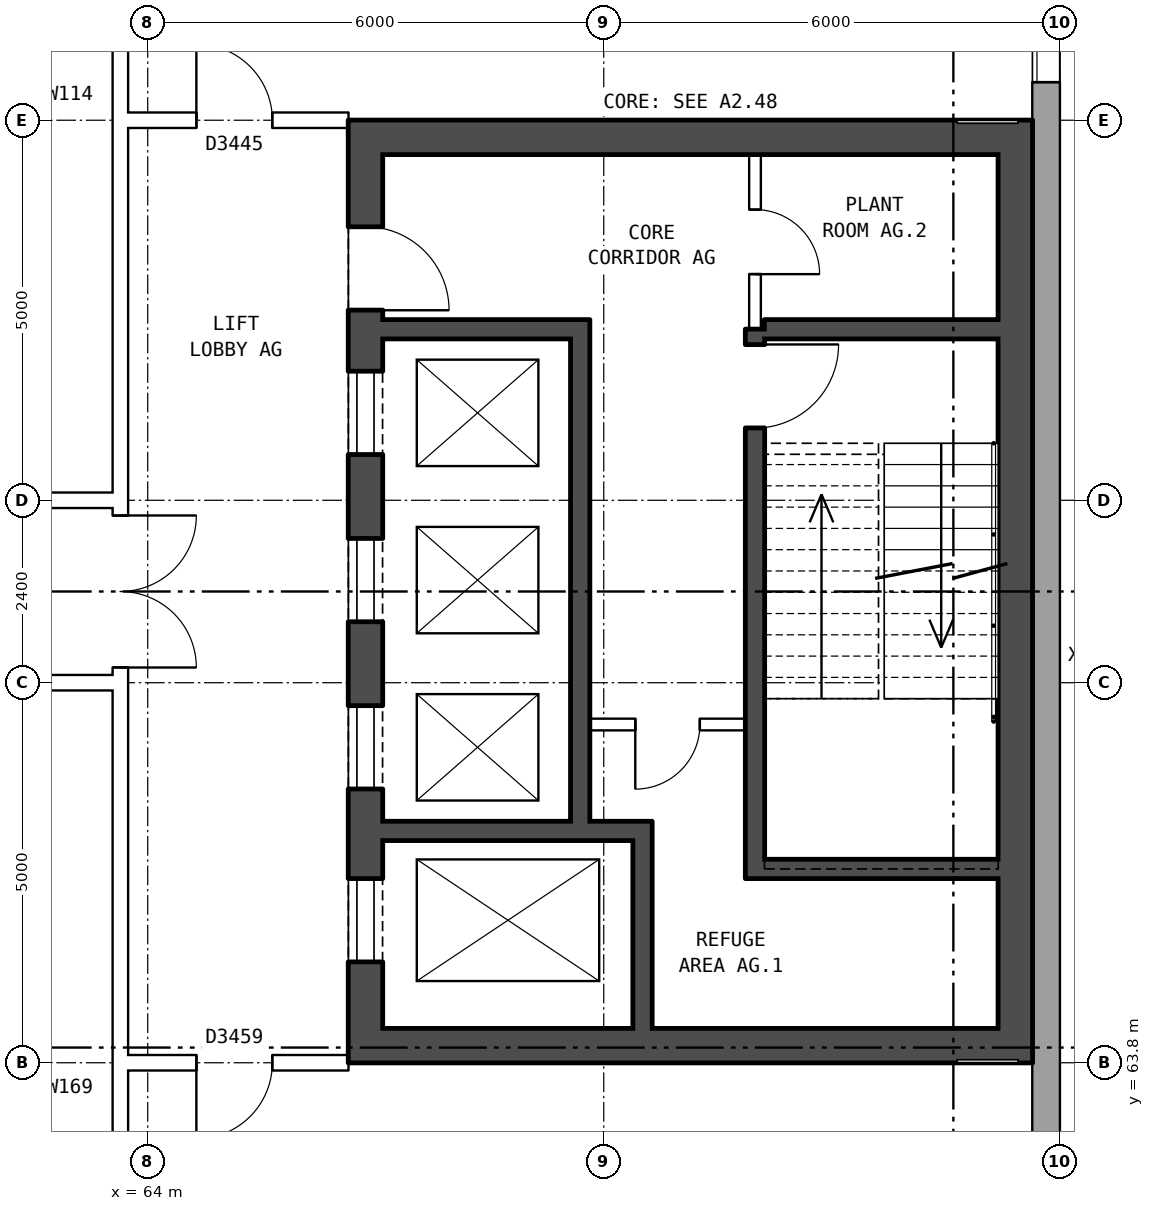
"""IFC4 building model, lengths in metres.
Left out: names, types, materials, properties, quantities, classifications, styles, units other than length and angle.
Written with IfcOpenShell. Run it as: python <this file> out.ifc"""

import sys

from ifc_helpers import new_model, si_unit, direction, frame, frame_2d, origin, place, context, subcontext, project, spatial, rectangle, extrude, element, fill, save


model = new_model("IFC4")
c1 = context("Model", 3, precision=1e-05, world=origin(), true_north=direction((0.0, 1.0)))
c2 = subcontext(c1, "Body", "Model", "MODEL_VIEW")
j1 = project(units=[si_unit("LENGTHUNIT", "METRE"), si_unit("PLANEANGLEUNIT", "RADIAN")], contexts=[c1])
p1 = place(None, origin())
s1 = spatial("IfcSite", under=j1, at=p1, CompositionType="ELEMENT")
p2 = place(p1, origin())
s2 = spatial("IfcBuilding", under=s1, at=p2, CompositionType="ELEMENT")
p3 = place(p2, frame((0.0, 0.0, 167.1)))
s3 = spatial("IfcBuildingStorey", under=s2, at=p3, CompositionType="ELEMENT", Elevation=167.1)
p4 = place(p3, frame((75.82, 57.075, 0.0), z_axis=(0.0, 0.0, 1.0), x_axis=(0.0, 1.0, 0.0)))
e1 = element("IfcWall", 1, at=p4, inside=s3, PredefinedType="STANDARD", context=c2, shape_type="SweptSolid", body=[
    extrude(rectangle(XDim=25.851, YDim=0.36, at=frame_2d((12.925, 0.0))), origin(), (0.0, 0.0, 1.0), 4.2),
])
p5 = place(p4, frame((2.9, 0.0, 1.5)))
e2 = element("IfcOpeningElement", 2, at=p5, cuts=e1, PredefinedType="OPENING", context=c2, shape_type="SweptSolid", body=[
    extrude(rectangle(XDim=0.6, YDim=1.2, at=frame_2d((0.3, 0.6))), frame((0.0, 0.19, 0.0), z_axis=(0.0, -1.0, 0.0), x_axis=(1.0, 0.0, 0.0)), (0.0, 0.0, 1.0), 0.38),
])
p6 = place(p4, frame((3.925, 0.0, 1.5)))
e3 = element("IfcOpeningElement", 3, at=p6, cuts=e1, PredefinedType="OPENING", context=c2, shape_type="SweptSolid", body=[
    extrude(rectangle(XDim=0.6, YDim=1.2, at=frame_2d((0.3, 0.6))), frame((0.0, 0.19, 0.0), z_axis=(0.0, -1.0, 0.0), x_axis=(1.0, 0.0, 0.0)), (0.0, 0.0, 1.0), 0.38),
])
p7 = place(p4, frame((19.625, 0.0, 1.5)))
e4 = element("IfcOpeningElement", 4, at=p7, cuts=e1, PredefinedType="OPENING", context=c2, shape_type="SweptSolid", body=[
    extrude(rectangle(XDim=1.6, YDim=1.2, at=frame_2d((0.8, 0.6))), frame((0.0, 0.19, 0.0), z_axis=(0.0, -1.0, 0.0), x_axis=(1.0, 0.0, 0.0)), (0.0, 0.0, 1.0), 0.38),
])
p8 = place(p4, frame((22.325, 0.0, 1.5)))
e5 = element("IfcOpeningElement", 5, at=p8, cuts=e1, PredefinedType="OPENING", context=c2, shape_type="SweptSolid", body=[
    extrude(rectangle(XDim=0.6, YDim=1.2, at=frame_2d((0.3, 0.6))), frame((0.0, 0.19, 0.0), z_axis=(0.0, -1.0, 0.0), x_axis=(1.0, 0.0, 0.0)), (0.0, 0.0, 1.0), 0.38),
])
p9 = place(p3, frame((66.865, 63.8, 0.0), z_axis=(0.0, 0.0, 1.0), x_axis=(0.0, 1.0, 0.0)))
e6 = element("IfcWall", 6, at=p9, inside=s3, PredefinedType="SHEAR", context=c2, shape_type="SweptSolid", body=[
    extrude(rectangle(XDim=12.4, YDim=0.45, at=frame_2d((6.2, 0.0))), origin(), (0.0, 0.0, 1.0), 4.2),
])
p10 = place(p9, frame((1.325, 0.0, 0.0)))
e7 = element("IfcOpeningElement", 7, at=p10, cuts=e6, PredefinedType="OPENING", context=c2, shape_type="SweptSolid", body=[
    extrude(rectangle(XDim=1.1, YDim=2.1, at=frame_2d((0.55, 1.05))), frame((0.0, 0.235, 0.0), z_axis=(0.0, -1.0, 0.0), x_axis=(1.0, 0.0, 0.0)), (0.0, 0.0, 1.0), 0.47),
])
p11 = place(p9, frame((3.6, 0.0, 0.0)))
e8 = element("IfcOpeningElement", 8, at=p11, cuts=e6, PredefinedType="OPENING", context=c2, shape_type="SweptSolid", body=[
    extrude(rectangle(XDim=1.1, YDim=2.1, at=frame_2d((0.55, 1.05))), frame((0.0, 0.235, 0.0), z_axis=(0.0, -1.0, 0.0), x_axis=(1.0, 0.0, 0.0)), (0.0, 0.0, 1.0), 0.47),
])
p12 = place(p9, frame((5.8, 0.0, 0.0)))
e9 = element("IfcOpeningElement", 9, at=p12, cuts=e6, PredefinedType="OPENING", context=c2, shape_type="SweptSolid", body=[
    extrude(rectangle(XDim=1.1, YDim=2.1, at=frame_2d((0.55, 1.05))), frame((0.0, 0.235, 0.0), z_axis=(0.0, -1.0, 0.0), x_axis=(1.0, 0.0, 0.0)), (0.0, 0.0, 1.0), 0.47),
])
p13 = place(p9, frame((8.0, 0.0, 0.0)))
e10 = element("IfcOpeningElement", 10, at=p13, cuts=e6, PredefinedType="OPENING", context=c2, shape_type="SweptSolid", body=[
    extrude(rectangle(XDim=1.1, YDim=2.1, at=frame_2d((0.55, 1.05))), frame((0.0, 0.235, 0.0), z_axis=(0.0, -1.0, 0.0), x_axis=(1.0, 0.0, 0.0)), (0.0, 0.0, 1.0), 0.47),
])
p14 = place(p9, frame((9.9, 0.0, 0.0)))
e11 = element("IfcOpeningElement", 11, at=p14, cuts=e6, PredefinedType="OPENING", context=c2, shape_type="SweptSolid", body=[
    extrude(rectangle(XDim=1.1, YDim=2.1, at=frame_2d((0.55, 1.05))), frame((0.0, 0.235, 0.0), z_axis=(0.0, -1.0, 0.0), x_axis=(1.0, 0.0, 0.0)), (0.0, 0.0, 1.0), 0.47),
])
p15 = place(p3, frame((75.415, 63.8, 0.0), z_axis=(0.0, 0.0, 1.0), x_axis=(0.0, 1.0, 0.0)))
e12 = element("IfcWall", 12, at=p15, inside=s3, PredefinedType="SHEAR", context=c2, shape_type="SweptSolid", body=[
    extrude(rectangle(XDim=12.4, YDim=0.45, at=frame_2d((6.2, 0.0))), origin(), (0.0, 0.0, 1.0), 4.2),
])
for number, where, z_axis, x_axis in (
    (13, (67.09, 64.025, 0.0), (0.0, 0.0, 1.0), (1.0, 0.0, 0.0)),
    (14, (67.09, 75.975, 0.0), (0.0, 0.0, 1.0), (1.0, 0.0, 0.0)),
):
    element("IfcWall", number, at=place(p3, frame(where, z_axis=z_axis, x_axis=x_axis)), inside=s3, PredefinedType="SHEAR", context=c2, shape_type="SweptSolid", body=[
        extrude(rectangle(XDim=8.1, YDim=0.45, at=frame_2d((4.05, 0.0))), origin(), (0.0, 0.0, 1.0), 4.2),
    ])
p16 = place(p3, frame((72.115, 66.35, 0.0), z_axis=(0.0, 0.0, 1.0), x_axis=(1.0, 0.0, 0.0)))
e15 = element("IfcWall", 15, at=p16, inside=s3, PredefinedType="SHEAR", context=c2, shape_type="SweptSolid", body=[
    extrude(rectangle(XDim=3.075, YDim=0.25, at=frame_2d((1.538, 0.0))), origin(), (0.0, 0.0, 1.0), 4.2),
])
p17 = place(p3, frame((67.09, 66.85, 0.0), z_axis=(0.0, 0.0, 1.0), x_axis=(1.0, 0.0, 0.0)))
e16 = element("IfcWall", 16, at=p17, inside=s3, PredefinedType="SHEAR", context=c2, shape_type="SweptSolid", body=[
    extrude(rectangle(XDim=3.545, YDim=0.25, at=frame_2d((1.772, 0.0))), origin(), (0.0, 0.0, 1.0), 4.2),
])
p18 = place(p3, frame((69.815, 68.25, 0.0), z_axis=(0.0, 0.0, 1.0), x_axis=(1.0, 0.0, 0.0)))
e17 = element("IfcWall", 17, at=p18, inside=s3, PredefinedType="PARTITIONING", context=c2, shape_type="SweptSolid", body=[
    extrude(rectangle(XDim=2.05, YDim=0.15, at=frame_2d((1.025, 0.0))), origin(), (0.0, 0.0, 1.0), 4.2),
])
p19 = place(p18, frame((0.6, 0.0, 0.0)))
e18 = element("IfcOpeningElement", 18, at=p19, cuts=e17, PredefinedType="OPENING", context=c2, shape_type="SweptSolid", body=[
    extrude(rectangle(XDim=0.85, YDim=2.1, at=frame_2d((0.425, 1.05))), frame((0.0, 0.085, 0.0), z_axis=(0.0, -1.0, 0.0), x_axis=(1.0, 0.0, 0.0)), (0.0, 0.0, 1.0), 0.17),
])
p20 = place(p3, frame((67.09, 73.45, 0.0), z_axis=(0.0, 0.0, 1.0), x_axis=(1.0, 0.0, 0.0)))
e19 = element("IfcWall", 19, at=p20, inside=s3, PredefinedType="SHEAR", context=c2, shape_type="SweptSolid", body=[
    extrude(rectangle(XDim=2.475, YDim=0.25, at=frame_2d((1.237, 0.0))), origin(), (0.0, 0.0, 1.0), 4.2),
])
p21 = place(p3, frame((72.115, 73.45, 0.0), z_axis=(0.0, 0.0, 1.0), x_axis=(1.0, 0.0, 0.0)))
e20 = element("IfcWall", 20, at=p21, inside=s3, PredefinedType="SHEAR", context=c2, shape_type="SweptSolid", body=[
    extrude(rectangle(XDim=3.075, YDim=0.25, at=frame_2d((1.538, 0.0))), origin(), (0.0, 0.0, 1.0), 4.2),
])
p22 = place(p3, frame((69.69, 66.975, 0.0), z_axis=(0.0, 0.0, 1.0), x_axis=(0.0, 1.0, 0.0)))
e21 = element("IfcWall", 21, at=p22, inside=s3, PredefinedType="SHEAR", context=c2, shape_type="SweptSolid", body=[
    extrude(rectangle(XDim=6.6, YDim=0.25, at=frame_2d((3.3, 0.0))), origin(), (0.0, 0.0, 1.0), 4.2),
])
p23 = place(p3, frame((70.51, 64.25, 0.0), z_axis=(0.0, 0.0, 1.0), x_axis=(0.0, 1.0, 0.0)))
e22 = element("IfcWall", 22, at=p23, inside=s3, PredefinedType="SHEAR", context=c2, shape_type="SweptSolid", body=[
    extrude(rectangle(XDim=2.475, YDim=0.25, at=frame_2d((1.238, 0.0))), origin(), (0.0, 0.0, 1.0), 4.2),
])
p24 = place(p3, frame((71.99, 66.225, 0.0), z_axis=(0.0, 0.0, 1.0), x_axis=(0.0, 1.0, 0.0)))
e23 = element("IfcWall", 23, at=p24, inside=s3, PredefinedType="SHEAR", context=c2, shape_type="SweptSolid", body=[
    extrude(rectangle(XDim=7.225, YDim=0.25, at=frame_2d((3.612, 0.0))), origin(), (0.0, 0.0, 1.0), 4.2),
])
p25 = place(p24, frame((5.925, 0.0, 0.0)))
e24 = element("IfcOpeningElement", 24, at=p25, cuts=e23, PredefinedType="OPENING", context=c2, shape_type="SweptSolid", body=[
    extrude(rectangle(XDim=1.1, YDim=2.1, at=frame_2d((0.55, 1.05))), frame((0.0, 0.135, 0.0), z_axis=(0.0, -1.0, 0.0), x_axis=(1.0, 0.0, 0.0)), (0.0, 0.0, 1.0), 0.27),
])
p26 = place(p3, frame((71.99, 73.45, 0.0), z_axis=(0.0, 0.0, 1.0), x_axis=(0.0, 1.0, 0.0)))
e25 = element("IfcWall", 25, at=p26, inside=s3, PredefinedType="PARTITIONING", context=c2, shape_type="SweptSolid", body=[
    extrude(rectangle(XDim=2.3, YDim=0.15, at=frame_2d((1.15, 0.0))), origin(), (0.0, 0.0, 1.0), 4.2),
])
p27 = place(p26, frame((0.725, 0.0, 0.0)))
e26 = element("IfcOpeningElement", 26, at=p27, cuts=e25, PredefinedType="OPENING", context=c2, shape_type="SweptSolid", body=[
    extrude(rectangle(XDim=0.85, YDim=2.1, at=frame_2d((0.425, 1.05))), frame((0.0, 0.085, 0.0), z_axis=(0.0, -1.0, 0.0), x_axis=(1.0, 0.0, 0.0)), (0.0, 0.0, 1.0), 0.17),
])
p28 = place(p3, frame((63.64, 63.9, 0.0), z_axis=(0.0, 0.0, 1.0), x_axis=(0.0, 1.0, 0.0)))
e27 = element("IfcWall", 27, at=p28, inside=s3, PredefinedType="PARTITIONING", context=c2, shape_type="SweptSolid", body=[
    extrude(rectangle(XDim=12.2, YDim=0.2, at=frame_2d((6.1, 0.0))), origin(), (0.0, 0.0, 1.0), 4.2),
])
p29 = place(p28, frame((5.1, 0.0, 0.0)))
e28 = element("IfcOpeningElement", 28, at=p29, cuts=e27, PredefinedType="OPENING", context=c2, shape_type="SweptSolid", body=[
    extrude(rectangle(XDim=2.0, YDim=2.1, at=frame_2d((1.0, 1.05))), frame((0.0, 0.11, 0.0), z_axis=(0.0, -1.0, 0.0), x_axis=(1.0, 0.0, 0.0)), (0.0, 0.0, 1.0), 0.22),
])
p30 = place(p3, frame((63.54, 63.8, 0.0), z_axis=(0.0, 0.0, 1.0), x_axis=(1.0, 0.0, 0.0)))
e29 = element("IfcWall", 29, at=p30, inside=s3, PredefinedType="PARTITIONING", context=c2, shape_type="SweptSolid", body=[
    extrude(rectangle(XDim=3.1, YDim=0.2, at=frame_2d((1.55, 0.0))), origin(), (0.0, 0.0, 1.0), 4.2),
])
p31 = place(p30, frame((1.1, 0.0, 0.0)))
e30 = element("IfcOpeningElement", 30, at=p31, cuts=e29, PredefinedType="OPENING", context=c2, shape_type="SweptSolid", body=[
    extrude(rectangle(XDim=1.0, YDim=2.1, at=frame_2d((0.5, 1.05))), frame((0.0, 0.11, 0.0), z_axis=(0.0, -1.0, 0.0), x_axis=(1.0, 0.0, 0.0)), (0.0, 0.0, 1.0), 0.22),
])
p32 = place(p3, frame((44.36, 68.8, 0.0), z_axis=(0.0, 0.0, 1.0), x_axis=(1.0, 0.0, 0.0)))
e31 = element("IfcWall", 31, at=p32, inside=s3, PredefinedType="PARTITIONING", context=c2, shape_type="SweptSolid", body=[
    extrude(rectangle(XDim=19.28, YDim=0.2, at=frame_2d((9.64, 0.0))), origin(), (0.0, 0.0, 1.0), 4.2),
])
p33 = place(p3, frame((44.36, 71.2, 0.0), z_axis=(0.0, 0.0, 1.0), x_axis=(1.0, 0.0, 0.0)))
e32 = element("IfcWall", 32, at=p33, inside=s3, PredefinedType="PARTITIONING", context=c2, shape_type="SweptSolid", body=[
    extrude(rectangle(XDim=19.28, YDim=0.2, at=frame_2d((9.64, 0.0))), origin(), (0.0, 0.0, 1.0), 4.2),
])
p34 = place(p33, frame((10.14, 0.0, 0.0)))
e33 = element("IfcOpeningElement", 33, at=p34, cuts=e32, PredefinedType="OPENING", context=c2, shape_type="SweptSolid", body=[
    extrude(rectangle(XDim=1.0, YDim=2.1, at=frame_2d((0.5, 1.05))), frame((0.0, 0.11, 0.0), z_axis=(0.0, -1.0, 0.0), x_axis=(1.0, 0.0, 0.0)), (0.0, 0.0, 1.0), 0.22),
])
p35 = place(p3, frame((63.54, 76.2, 0.0), z_axis=(0.0, 0.0, 1.0), x_axis=(1.0, 0.0, 0.0)))
e34 = element("IfcWall", 34, at=p35, inside=s3, PredefinedType="PARTITIONING", context=c2, shape_type="SweptSolid", body=[
    extrude(rectangle(XDim=3.1, YDim=0.2, at=frame_2d((1.55, 0.0))), origin(), (0.0, 0.0, 1.0), 4.2),
])
p36 = place(p35, frame((1.1, 0.0, 0.0)))
e35 = element("IfcOpeningElement", 35, at=p36, cuts=e34, PredefinedType="OPENING", context=c2, shape_type="SweptSolid", body=[
    extrude(rectangle(XDim=1.0, YDim=2.1, at=frame_2d((0.5, 1.05))), frame((0.0, 0.11, 0.0), z_axis=(0.0, -1.0, 0.0), x_axis=(1.0, 0.0, 0.0)), (0.0, 0.0, 1.0), 0.22),
])
p37 = place(p3, frame((63.64, 60.7, 0.0), z_axis=(0.0, 0.0, 1.0), x_axis=(0.0, 1.0, 0.0)))
e36 = element("IfcWall", 36, at=p37, inside=s3, PredefinedType="PARTITIONING", context=c2, shape_type="SweptSolid", body=[
    extrude(rectangle(XDim=3.2, YDim=0.2, at=frame_2d((1.6, 0.0))), origin(), (0.0, 0.0, 1.0), 4.2),
])
p38 = place(p37, frame((1.1, 0.0, 0.0)))
e37 = element("IfcOpeningElement", 37, at=p38, cuts=e36, PredefinedType="OPENING", context=c2, shape_type="SweptSolid", body=[
    extrude(rectangle(XDim=1.0, YDim=2.1, at=frame_2d((0.5, 1.05))), frame((0.0, 0.11, 0.0), z_axis=(0.0, -1.0, 0.0), x_axis=(1.0, 0.0, 0.0)), (0.0, 0.0, 1.0), 0.22),
])
p39 = place(p3, frame((63.64, 76.1, 0.0), z_axis=(0.0, 0.0, 1.0), x_axis=(0.0, 1.0, 0.0)))
e38 = element("IfcWall", 38, at=p39, inside=s3, PredefinedType="PARTITIONING", context=c2, shape_type="SweptSolid", body=[
    extrude(rectangle(XDim=3.2, YDim=0.2, at=frame_2d((1.6, 0.0))), origin(), (0.0, 0.0, 1.0), 4.2),
])
p40 = place(p39, frame((1.1, 0.0, 0.0)))
e39 = element("IfcOpeningElement", 39, at=p40, cuts=e38, PredefinedType="OPENING", context=c2, shape_type="SweptSolid", body=[
    extrude(rectangle(XDim=1.0, YDim=2.1, at=frame_2d((0.5, 1.05))), frame((0.0, 0.11, 0.0), z_axis=(0.0, -1.0, 0.0), x_axis=(1.0, 0.0, 0.0)), (0.0, 0.0, 1.0), 0.22),
])
p41 = place(p7, origin())
e40 = element("IfcWindow", 40, at=p41, inside=s3, PartitioningType="DOUBLE_PANEL_HORIZONTAL", PredefinedType="WINDOW", context=c2, shape_type="SweptSolid", body=[
    extrude(rectangle(XDim=1.6, YDim=1.2, at=frame_2d((0.8, 0.6))), frame((0.0, 0.15, 0.0), z_axis=(0.0, -1.0, 0.0), x_axis=(1.0, 0.0, 0.0)), (0.0, 0.0, 1.0), 0.06),
])
fill(e4, e40)
p42 = place(p10, origin())
e41 = element("IfcDoor", 41, at=p42, inside=s3, OperationType="DOUBLE_DOOR_SLIDING", PredefinedType="DOOR", context=c2, shape_type="SweptSolid", body=[
    extrude(rectangle(XDim=1.1, YDim=2.1, at=frame_2d((0.55, 1.05))), frame((0.0, -0.16, 0.0), z_axis=(0.0, -1.0, 0.0), x_axis=(1.0, 0.0, 0.0)), (0.0, 0.0, 1.0), 0.05),
])
fill(e7, e41)
p43 = place(p11, origin())
e42 = element("IfcDoor", 42, at=p43, inside=s3, OperationType="DOUBLE_DOOR_SLIDING", PredefinedType="DOOR", context=c2, shape_type="SweptSolid", body=[
    extrude(rectangle(XDim=1.1, YDim=2.1, at=frame_2d((0.55, 1.05))), frame((0.0, -0.16, 0.0), z_axis=(0.0, -1.0, 0.0), x_axis=(1.0, 0.0, 0.0)), (0.0, 0.0, 1.0), 0.05),
])
fill(e8, e42)
p44 = place(p12, origin())
e43 = element("IfcDoor", 43, at=p44, inside=s3, OperationType="DOUBLE_DOOR_SLIDING", PredefinedType="DOOR", context=c2, shape_type="SweptSolid", body=[
    extrude(rectangle(XDim=1.1, YDim=2.1, at=frame_2d((0.55, 1.05))), frame((0.0, -0.16, 0.0), z_axis=(0.0, -1.0, 0.0), x_axis=(1.0, 0.0, 0.0)), (0.0, 0.0, 1.0), 0.05),
])
fill(e9, e43)
p45 = place(p13, origin())
e44 = element("IfcDoor", 44, at=p45, inside=s3, OperationType="DOUBLE_DOOR_SLIDING", PredefinedType="DOOR", context=c2, shape_type="SweptSolid", body=[
    extrude(rectangle(XDim=1.1, YDim=2.1, at=frame_2d((0.55, 1.05))), frame((0.0, -0.16, 0.0), z_axis=(0.0, -1.0, 0.0), x_axis=(1.0, 0.0, 0.0)), (0.0, 0.0, 1.0), 0.05),
])
fill(e10, e44)
p46 = place(p14, frame((1.1, 0.0, 0.0), z_axis=(0.0, 0.0, 1.0), x_axis=(-1.0, 0.0, 0.0)))
e45 = element("IfcDoor", 45, at=p46, inside=s3, OperationType="SINGLE_SWING_RIGHT", PredefinedType="DOOR", context=c2, shape_type="SweptSolid", body=[
    extrude(rectangle(XDim=1.1, YDim=2.1, at=frame_2d((0.55, 1.05))), frame((0.0, 0.21, 0.0), z_axis=(0.0, -1.0, 0.0), x_axis=(1.0, 0.0, 0.0)), (0.0, 0.0, 1.0), 0.05),
])
fill(e11, e45)
p47 = place(p25, frame((1.1, 0.0, 0.0), z_axis=(0.0, 0.0, 1.0), x_axis=(-1.0, 0.0, 0.0)))
e46 = element("IfcDoor", 46, at=p47, inside=s3, OperationType="SINGLE_SWING_LEFT", PredefinedType="DOOR", context=c2, shape_type="SweptSolid", body=[
    extrude(rectangle(XDim=1.1, YDim=2.1, at=frame_2d((0.55, 1.05))), frame((0.0, 0.025, 0.0), z_axis=(0.0, -1.0, 0.0), x_axis=(1.0, 0.0, 0.0)), (0.0, 0.0, 1.0), 0.05),
])
fill(e24, e46)
p48 = place(p19, frame((0.85, 0.0, 0.0), z_axis=(0.0, 0.0, 1.0), x_axis=(-1.0, 0.0, 0.0)))
e47 = element("IfcDoor", 47, at=p48, inside=s3, OperationType="SINGLE_SWING_RIGHT", PredefinedType="DOOR", context=c2, shape_type="SweptSolid", body=[
    extrude(rectangle(XDim=0.85, YDim=2.1, at=frame_2d((0.425, 1.05))), frame((0.0, 0.025, 0.0), z_axis=(0.0, -1.0, 0.0), x_axis=(1.0, 0.0, 0.0)), (0.0, 0.0, 1.0), 0.05),
])
fill(e18, e47)
p49 = place(p27, frame((0.85, 0.0, 0.0), z_axis=(0.0, 0.0, 1.0), x_axis=(-1.0, 0.0, 0.0)))
e48 = element("IfcDoor", 48, at=p49, inside=s3, OperationType="SINGLE_SWING_RIGHT", PredefinedType="DOOR", context=c2, shape_type="SweptSolid", body=[
    extrude(rectangle(XDim=0.85, YDim=2.1, at=frame_2d((0.425, 1.05))), frame((0.0, 0.025, 0.0), z_axis=(0.0, -1.0, 0.0), x_axis=(1.0, 0.0, 0.0)), (0.0, 0.0, 1.0), 0.05),
])
fill(e26, e48)
p50 = place(p29, frame((2.0, 0.0, 0.0), z_axis=(0.0, 0.0, 1.0), x_axis=(-1.0, 0.0, 0.0)))
e49 = element("IfcDoor", 49, at=p50, inside=s3, OperationType="DOUBLE_DOOR_SINGLE_SWING", PredefinedType="DOOR", context=c2, shape_type="SweptSolid", body=[
    extrude(rectangle(XDim=2.0, YDim=2.1, at=frame_2d((1.0, 1.05))), frame((0.0, 0.025, 0.0), z_axis=(0.0, -1.0, 0.0), x_axis=(1.0, 0.0, 0.0)), (0.0, 0.0, 1.0), 0.05),
])
fill(e28, e49)
p51 = place(p31, frame((1.0, 0.0, 0.0), z_axis=(0.0, 0.0, 1.0), x_axis=(-1.0, 0.0, 0.0)))
e50 = element("IfcDoor", 50, at=p51, inside=s3, OperationType="SINGLE_SWING_RIGHT", PredefinedType="DOOR", context=c2, shape_type="SweptSolid", body=[
    extrude(rectangle(XDim=1.0, YDim=2.1, at=frame_2d((0.5, 1.05))), frame((0.0, 0.025, 0.0), z_axis=(0.0, -1.0, 0.0), x_axis=(1.0, 0.0, 0.0)), (0.0, 0.0, 1.0), 0.05),
])
fill(e30, e50)
p52 = place(p36, origin())
e51 = element("IfcDoor", 51, at=p52, inside=s3, OperationType="SINGLE_SWING_LEFT", PredefinedType="DOOR", context=c2, shape_type="SweptSolid", body=[
    extrude(rectangle(XDim=1.0, YDim=2.1, at=frame_2d((0.5, 1.05))), frame((0.0, 0.025, 0.0), z_axis=(0.0, -1.0, 0.0), x_axis=(1.0, 0.0, 0.0)), (0.0, 0.0, 1.0), 0.05),
])
fill(e35, e51)
save(model, sys.argv[1])
